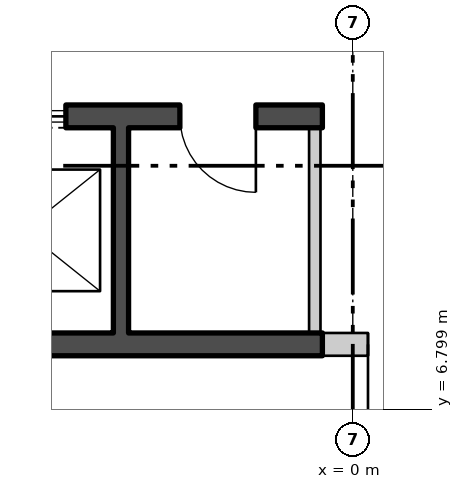
"""IFC4 building model, lengths in metres.
Left out: names, types, materials, properties, quantities, classifications, styles, units other than length and angle.
Written with IfcOpenShell. Run it as: python <this file> out.ifc"""

import sys

from ifc_helpers import new_model, si_unit, direction, frame, frame_2d, origin, place, context, subcontext, project, spatial, polyline, rectangle, outline, extrude, element, fill, save


model = new_model("IFC4")
c1 = context("Model", 3, precision=1e-05, world=origin(), true_north=direction((0.0, 1.0)))
c2 = subcontext(c1, "Body", "Model", "MODEL_VIEW")
j1 = project(units=[si_unit("LENGTHUNIT", "METRE"), si_unit("PLANEANGLEUNIT", "RADIAN")], contexts=[c1])
p1 = place(None, origin())
s1 = spatial("IfcSite", under=j1, at=p1, CompositionType="ELEMENT")
p2 = place(p1, origin())
s2 = spatial("IfcBuilding", under=s1, at=p2, CompositionType="ELEMENT")
p3 = place(p2, frame((0.0, 0.0, 192.6)))
s3 = spatial("IfcBuildingStorey", under=s2, at=p3, CompositionType="ELEMENT", Elevation=192.6)
p4 = place(p3, frame((-26.54, 13.618, -0.18), z_axis=(0.0, 0.0, 1.0), x_axis=(0.499999764979, -0.866025539474, 0.0)))
e1 = element("IfcWall", 1, at=p4, inside=s3, PredefinedType="SOLIDWALL", context=c2, shape_type="SweptSolid", body=[
    extrude(outline(polyline([(-0.13, -0.225), (45.87, -0.225), (45.61, 0.225), (0.13, 0.225), (-0.13, -0.225)])), origin(), (0.0, 0.0, 1.0), 3.68),
])
p5 = place(p4, frame((1.424, 0.0, 1.08)))
e2 = element("IfcOpeningElement", 2, at=p5, cuts=e1, PredefinedType="OPENING", context=c2, shape_type="SweptSolid", body=[
    extrude(rectangle(XDim=2.4, YDim=2.0, at=frame_2d((1.2, 1.0))), frame((0.0, 0.235, 0.0), z_axis=(0.0, -1.0, 0.0), x_axis=(1.0, 0.0, 0.0)), (0.0, 0.0, 1.0), 0.47),
])
p6 = place(p4, frame((5.893, 0.0, 1.08)))
e3 = element("IfcOpeningElement", 3, at=p6, cuts=e1, PredefinedType="OPENING", context=c2, shape_type="SweptSolid", body=[
    extrude(rectangle(XDim=2.4, YDim=2.0, at=frame_2d((1.2, 1.0))), frame((0.0, 0.235, 0.0), z_axis=(0.0, -1.0, 0.0), x_axis=(1.0, 0.0, 0.0)), (0.0, 0.0, 1.0), 0.47),
])
p7 = place(p4, frame((10.401, 0.0, 1.08)))
e4 = element("IfcOpeningElement", 4, at=p7, cuts=e1, PredefinedType="OPENING", context=c2, shape_type="SweptSolid", body=[
    extrude(rectangle(XDim=2.4, YDim=2.0, at=frame_2d((1.2, 1.0))), frame((0.0, 0.235, 0.0), z_axis=(0.0, -1.0, 0.0), x_axis=(1.0, 0.0, 0.0)), (0.0, 0.0, 1.0), 0.47),
])
p8 = place(p4, frame((14.909, 0.0, 1.08)))
e5 = element("IfcOpeningElement", 5, at=p8, cuts=e1, PredefinedType="OPENING", context=c2, shape_type="SweptSolid", body=[
    extrude(rectangle(XDim=2.4, YDim=2.0, at=frame_2d((1.2, 1.0))), frame((0.0, 0.235, 0.0), z_axis=(0.0, -1.0, 0.0), x_axis=(1.0, 0.0, 0.0)), (0.0, 0.0, 1.0), 0.47),
])
p9 = place(p4, frame((19.416, 0.0, 1.08)))
e6 = element("IfcOpeningElement", 6, at=p9, cuts=e1, PredefinedType="OPENING", context=c2, shape_type="SweptSolid", body=[
    extrude(rectangle(XDim=2.4, YDim=2.0, at=frame_2d((1.2, 1.0))), frame((0.0, 0.235, 0.0), z_axis=(0.0, -1.0, 0.0), x_axis=(1.0, 0.0, 0.0)), (0.0, 0.0, 1.0), 0.47),
])
p10 = place(p4, frame((23.924, 0.0, 1.08)))
e7 = element("IfcOpeningElement", 7, at=p10, cuts=e1, PredefinedType="OPENING", context=c2, shape_type="SweptSolid", body=[
    extrude(rectangle(XDim=2.4, YDim=2.0, at=frame_2d((1.2, 1.0))), frame((0.0, 0.235, 0.0), z_axis=(0.0, -1.0, 0.0), x_axis=(1.0, 0.0, 0.0)), (0.0, 0.0, 1.0), 0.47),
])
p11 = place(p4, frame((28.431, 0.0, 1.08)))
e8 = element("IfcOpeningElement", 8, at=p11, cuts=e1, PredefinedType="OPENING", context=c2, shape_type="SweptSolid", body=[
    extrude(rectangle(XDim=2.4, YDim=2.0, at=frame_2d((1.2, 1.0))), frame((0.0, 0.235, 0.0), z_axis=(0.0, -1.0, 0.0), x_axis=(1.0, 0.0, 0.0)), (0.0, 0.0, 1.0), 0.47),
])
p12 = place(p4, frame((32.939, 0.0, 1.08)))
e9 = element("IfcOpeningElement", 9, at=p12, cuts=e1, PredefinedType="OPENING", context=c2, shape_type="SweptSolid", body=[
    extrude(rectangle(XDim=2.4, YDim=2.0, at=frame_2d((1.2, 1.0))), frame((0.0, 0.235, 0.0), z_axis=(0.0, -1.0, 0.0), x_axis=(1.0, 0.0, 0.0)), (0.0, 0.0, 1.0), 0.47),
])
p13 = place(p4, frame((41.916, 0.0, 1.08)))
e10 = element("IfcOpeningElement", 10, at=p13, cuts=e1, PredefinedType="OPENING", context=c2, shape_type="SweptSolid", body=[
    extrude(rectangle(XDim=2.4, YDim=2.0, at=frame_2d((1.2, 1.0))), frame((0.0, 0.235, 0.0), z_axis=(0.0, -1.0, 0.0), x_axis=(1.0, 0.0, 0.0)), (0.0, 0.0, 1.0), 0.47),
])
p14 = place(p3, frame((-10.7, 10.65, 0.0), z_axis=(0.0, 0.0, 1.0), x_axis=(1.0, 0.0, 0.0)))
e11 = element("IfcWall", 11, at=p14, inside=s3, PredefinedType="SHEAR", context=c2, shape_type="SweptSolid", body=[
    extrude(rectangle(XDim=10.3, YDim=0.3, at=frame_2d((5.15, 0.0))), origin(), (0.0, 0.0, 1.0), 3.7),
])
p15 = place(p14, frame((0.675, 0.0, 0.0)))
e12 = element("IfcOpeningElement", 12, at=p15, cuts=e11, PredefinedType="OPENING", context=c2, shape_type="SweptSolid", body=[
    extrude(rectangle(XDim=1.1, YDim=2.1, at=frame_2d((0.55, 1.05))), frame((0.0, 0.16, 0.0), z_axis=(0.0, -1.0, 0.0), x_axis=(1.0, 0.0, 0.0)), (0.0, 0.0, 1.0), 0.32),
])
p16 = place(p14, frame((3.275, 0.0, 0.0)))
e13 = element("IfcOpeningElement", 13, at=p16, cuts=e11, PredefinedType="OPENING", context=c2, shape_type="SweptSolid", body=[
    extrude(rectangle(XDim=1.1, YDim=2.1, at=frame_2d((0.55, 1.05))), frame((0.0, 0.16, 0.0), z_axis=(0.0, -1.0, 0.0), x_axis=(1.0, 0.0, 0.0)), (0.0, 0.0, 1.0), 0.32),
])
p17 = place(p14, frame((5.825, 0.0, 0.0)))
e14 = element("IfcOpeningElement", 14, at=p17, cuts=e11, PredefinedType="OPENING", context=c2, shape_type="SweptSolid", body=[
    extrude(rectangle(XDim=1.1, YDim=2.1, at=frame_2d((0.55, 1.05))), frame((0.0, 0.16, 0.0), z_axis=(0.0, -1.0, 0.0), x_axis=(1.0, 0.0, 0.0)), (0.0, 0.0, 1.0), 0.32),
])
p18 = place(p14, frame((8.425, 0.0, 0.0)))
e15 = element("IfcOpeningElement", 15, at=p18, cuts=e11, PredefinedType="OPENING", context=c2, shape_type="SweptSolid", body=[
    extrude(rectangle(XDim=1.0, YDim=2.1, at=frame_2d((0.5, 1.05))), frame((0.0, 0.16, 0.0), z_axis=(0.0, -1.0, 0.0), x_axis=(1.0, 0.0, 0.0)), (0.0, 0.0, 1.0), 0.32),
])
p19 = place(p3, frame((-10.7, 7.65, 0.0), z_axis=(0.0, 0.0, 1.0), x_axis=(1.0, 0.0, 0.0)))
e16 = element("IfcWall", 16, at=p19, inside=s3, PredefinedType="SHEAR", context=c2, shape_type="SweptSolid", body=[
    extrude(rectangle(XDim=10.3, YDim=0.3, at=frame_2d((5.15, 0.0))), origin(), (0.0, 0.0, 1.0), 3.7),
])
p20 = place(p3, frame((-3.05, 7.8, 0.0), z_axis=(0.0, 0.0, 1.0), x_axis=(0.0, 1.0, 0.0)))
e17 = element("IfcWall", 17, at=p20, inside=s3, PredefinedType="SHEAR", context=c2, shape_type="SweptSolid", body=[
    extrude(rectangle(XDim=2.7, YDim=0.2, at=frame_2d((1.35, 0.0))), origin(), (0.0, 0.0, 1.0), 3.7),
])
p21 = place(p3, frame((-0.5, 7.8, 0.0), z_axis=(0.0, 0.0, 1.0), x_axis=(0.0, 1.0, 0.0)))
e18 = element("IfcWall", 18, at=p21, inside=s3, PredefinedType="PARTITIONING", context=c2, shape_type="SweptSolid", body=[
    extrude(rectangle(XDim=2.7, YDim=0.15, at=frame_2d((1.35, 0.0))), origin(), (0.0, 0.0, 1.0), 3.7),
])
p22 = place(p3, frame((-0.4, 7.65, 0.0), z_axis=(0.0, 0.0, 1.0), x_axis=(1.0, 0.0, 0.0)))
e19 = element("IfcWall", 19, at=p22, inside=s3, PredefinedType="PARTITIONING", context=c2, shape_type="SweptSolid", body=[
    extrude(rectangle(XDim=3.0, YDim=0.3, at=frame_2d((1.5, 0.0))), origin(), (0.0, 0.0, 1.0), 3.7),
])
p23 = place(p22, frame((0.6, 0.0, 0.0)))
e20 = element("IfcOpeningElement", 20, at=p23, cuts=e19, PredefinedType="OPENING", context=c2, shape_type="SweptSolid", body=[
    extrude(rectangle(XDim=1.8, YDim=2.4, at=frame_2d((0.9, 1.2))), frame((0.0, 0.16, 0.0), z_axis=(0.0, -1.0, 0.0), x_axis=(1.0, 0.0, 0.0)), (0.0, 0.0, 1.0), 0.32),
])
p24 = place(p17, origin())
e21 = element("IfcDoor", 21, at=p24, inside=s3, OperationType="SLIDING_TO_LEFT", PredefinedType="DOOR", context=c2, shape_type="SweptSolid", body=[
    extrude(rectangle(XDim=1.1, YDim=2.1, at=frame_2d((0.55, 1.05))), frame((0.0, 0.025, 0.0), z_axis=(0.0, -1.0, 0.0), x_axis=(1.0, 0.0, 0.0)), (0.0, 0.0, 1.0), 0.05),
])
fill(e14, e21)
p25 = place(p18, origin())
e22 = element("IfcDoor", 22, at=p25, inside=s3, OperationType="SINGLE_SWING_RIGHT", PredefinedType="DOOR", context=c2, shape_type="SweptSolid", body=[
    extrude(rectangle(XDim=1.0, YDim=2.1, at=frame_2d((0.5, 1.05))), frame((0.0, 0.025, 0.0), z_axis=(0.0, -1.0, 0.0), x_axis=(1.0, 0.0, 0.0)), (0.0, 0.0, 1.0), 0.05),
])
fill(e15, e22)
p26 = place(p23, origin())
e23 = element("IfcDoor", 23, at=p26, inside=s3, OperationType="DOUBLE_DOOR_SINGLE_SWING", PredefinedType="DOOR", context=c2, shape_type="SweptSolid", body=[
    extrude(rectangle(XDim=1.8, YDim=2.4, at=frame_2d((0.9, 1.2))), frame((0.0, 0.025, 0.0), z_axis=(0.0, -1.0, 0.0), x_axis=(1.0, 0.0, 0.0)), (0.0, 0.0, 1.0), 0.05),
])
fill(e20, e23)
save(model, sys.argv[1])
